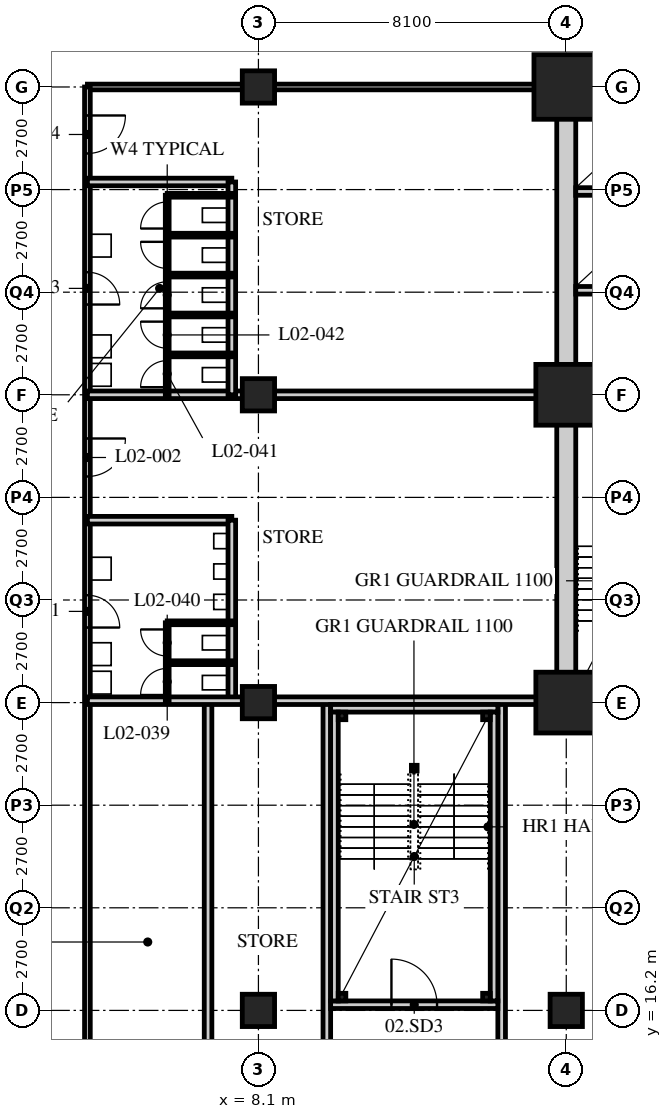
"""IFC4 building model, lengths in metres.
Left out: names, types, materials, properties, quantities, classifications, styles, units other than length and angle.
Written with IfcOpenShell. Run it as: python <this file> out.ifc"""

import sys

from ifc_helpers import new_model, si_unit, direction, frame, frame_2d, origin, origin_2d, place, context, subcontext, project, spatial, rectangle, hollow_rectangle, extrude, element, fill, save


model = new_model("IFC4")
c1 = context("Model", 3, precision=1e-05, world=origin(), true_north=direction((0.0, 1.0)))
c2 = subcontext(c1, "Body", "Model", "MODEL_VIEW")
j1 = project(units=[si_unit("LENGTHUNIT", "METRE"), si_unit("PLANEANGLEUNIT", "RADIAN")], contexts=[c1])
p1 = place(None, origin())
s1 = spatial("IfcSite", under=j1, at=p1, CompositionType="ELEMENT")
p2 = place(p1, origin())
s2 = spatial("IfcBuilding", under=s1, at=p2, CompositionType="ELEMENT")
p3 = place(p2, frame((0.0, 0.0, 11.4)))
s3 = spatial("IfcBuildingStorey", under=s2, at=p3, CompositionType="ELEMENT", Elevation=11.4)
for number, where, z_axis, x_axis in (
    (1, (8.1, 16.2, 0.0), (0.0, 0.0, 1.0), (1.0, 0.0, 0.0)),
    (2, (8.1, 24.3, 0.0), (0.0, 0.0, 1.0), (1.0, 0.0, 0.0)),
    (3, (8.1, 32.4, 0.0), (0.0, 0.0, 1.0), (1.0, 0.0, 0.0)),
    (4, (8.1, 40.5, 0.0), (0.0, 0.0, 1.0), (1.0, 0.0, 0.0)),
    (5, (16.2, 16.2, 0.0), (0.0, 0.0, 1.0), (1.0, 0.0, 0.0)),
):
    element("IfcColumn", number, at=place(p3, frame(where, z_axis=z_axis, x_axis=x_axis)), inside=s3, PredefinedType="COLUMN", context=c2, shape_type="SweptSolid", body=[
        extrude(hollow_rectangle(XDim=0.85, YDim=0.85, WallThickness=0.085, at=origin_2d()), origin(), (0.0, 0.0, 1.0), 5.4),
    ])
for number, where, z_axis, x_axis in (
    (6, (16.2, 24.3, 0.0), (0.0, 0.0, 1.0), (1.0, 0.0, 0.0)),
    (7, (16.2, 32.4, 0.0), (0.0, 0.0, 1.0), (1.0, 0.0, 0.0)),
):
    element("IfcColumn", number, at=place(p3, frame(where, z_axis=z_axis, x_axis=x_axis)), inside=s3, PredefinedType="COLUMN", context=c2, shape_type="SweptSolid", body=[
        extrude(hollow_rectangle(XDim=1.6, YDim=1.6, WallThickness=0.15, at=origin_2d()), origin(), (0.0, 0.0, 1.0), 5.4),
    ])
p4 = place(p3, frame((16.2, 40.5, 0.0), z_axis=(0.0, 0.0, 1.0), x_axis=(1.0, 0.0, 0.0)))
e8 = element("IfcColumn", 8, at=p4, inside=s3, PredefinedType="COLUMN", context=c2, shape_type="SweptSolid", body=[
    extrude(hollow_rectangle(XDim=1.7, YDim=1.7, WallThickness=0.16, at=origin_2d()), origin(), (0.0, 0.0, 1.0), 5.4),
])
p5 = place(p3, frame((16.0, 40.5, 0.0), z_axis=(0.0, 0.0, 1.0), x_axis=(-1.0, 0.0, 0.0)))
e9 = element("IfcWall", 9, at=p5, inside=s3, PredefinedType="PARTITIONING", context=c2, shape_type="SweptSolid", body=[
    extrude(rectangle(XDim=12.4, YDim=0.15, at=frame_2d((6.2, 0.0))), origin(), (0.0, 0.0, 1.0), 4.538),
])
p6 = place(p3, frame((3.6, 40.5, 0.0), z_axis=(0.0, 0.0, 1.0), x_axis=(0.0, -1.0, 0.0)))
e10 = element("IfcWall", 10, at=p6, inside=s3, PredefinedType="PARTITIONING", context=c2, shape_type="SweptSolid", body=[
    extrude(rectangle(XDim=28.8, YDim=0.15, at=frame_2d((14.4, 0.0))), origin(), (0.0, 0.0, 1.0), 5.15),
])
p7 = place(p6, frame((13.375, 0.0, 0.0)))
e11 = element("IfcOpeningElement", 11, at=p7, cuts=e10, PredefinedType="OPENING", context=c2, shape_type="SweptSolid", body=[
    extrude(rectangle(XDim=0.85, YDim=2.1, at=frame_2d((0.425, 1.05))), frame((0.0, 0.085, 0.0), z_axis=(0.0, -1.0, 0.0), x_axis=(1.0, 0.0, 0.0)), (0.0, 0.0, 1.0), 0.17),
])
p8 = place(p6, frame((9.25, 0.0, 0.0)))
e12 = element("IfcOpeningElement", 12, at=p8, cuts=e10, PredefinedType="OPENING", context=c2, shape_type="SweptSolid", body=[
    extrude(rectangle(XDim=1.0, YDim=2.1, at=frame_2d((0.5, 1.05))), frame((0.0, 0.085, 0.0), z_axis=(0.0, -1.0, 0.0), x_axis=(1.0, 0.0, 0.0)), (0.0, 0.0, 1.0), 0.17),
])
p9 = place(p6, frame((4.875, 0.0, 0.0)))
e13 = element("IfcOpeningElement", 13, at=p9, cuts=e10, PredefinedType="OPENING", context=c2, shape_type="SweptSolid", body=[
    extrude(rectangle(XDim=0.85, YDim=2.1, at=frame_2d((0.425, 1.05))), frame((0.0, 0.085, 0.0), z_axis=(0.0, -1.0, 0.0), x_axis=(1.0, 0.0, 0.0)), (0.0, 0.0, 1.0), 0.17),
])
p10 = place(p6, frame((0.75, 0.0, 0.0)))
e14 = element("IfcOpeningElement", 14, at=p10, cuts=e10, PredefinedType="OPENING", context=c2, shape_type="SweptSolid", body=[
    extrude(rectangle(XDim=1.0, YDim=2.1, at=frame_2d((0.5, 1.05))), frame((0.0, 0.085, 0.0), z_axis=(0.0, -1.0, 0.0), x_axis=(1.0, 0.0, 0.0)), (0.0, 0.0, 1.0), 0.17),
])
p11 = place(p3, frame((3.6, 32.4, 0.0), z_axis=(0.0, 0.0, 1.0), x_axis=(1.0, 0.0, 0.0)))
e15 = element("IfcWall", 15, at=p11, inside=s3, PredefinedType="SOLIDWALL", context=c2, shape_type="SweptSolid", body=[
    extrude(rectangle(XDim=12.6, YDim=0.2, at=frame_2d((6.3, 0.0))), origin(), (0.0, 0.0, 1.0), 4.538),
])
p12 = place(p3, frame((3.6, 29.1, 0.0), z_axis=(0.0, 0.0, 1.0), x_axis=(1.0, 0.0, 0.0)))
e16 = element("IfcWall", 16, at=p12, inside=s3, PredefinedType="SOLIDWALL", context=c2, shape_type="SweptSolid", body=[
    extrude(rectangle(XDim=3.8, YDim=0.2, at=frame_2d((1.9, 0.0))), origin(), (0.0, 0.0, 1.0), 5.15),
])
p13 = place(p3, frame((7.4, 24.3, 0.0), z_axis=(0.0, 0.0, 1.0), x_axis=(0.0, 1.0, 0.0)))
e17 = element("IfcWall", 17, at=p13, inside=s3, PredefinedType="SOLIDWALL", context=c2, shape_type="SweptSolid", body=[
    extrude(rectangle(XDim=4.8, YDim=0.2, at=frame_2d((2.4, 0.0))), origin(), (0.0, 0.0, 1.0), 5.15),
])
p14 = place(p3, frame((3.6, 38.0, 0.0), z_axis=(0.0, 0.0, 1.0), x_axis=(1.0, 0.0, 0.0)))
e18 = element("IfcWall", 18, at=p14, inside=s3, PredefinedType="SOLIDWALL", context=c2, shape_type="SweptSolid", body=[
    extrude(rectangle(XDim=3.8, YDim=0.2, at=frame_2d((1.9, 0.0))), origin(), (0.0, 0.0, 1.0), 5.15),
])
p15 = place(p3, frame((7.4, 32.4, 0.0), z_axis=(0.0, 0.0, 1.0), x_axis=(0.0, 1.0, 0.0)))
e19 = element("IfcWall", 19, at=p15, inside=s3, PredefinedType="SOLIDWALL", context=c2, shape_type="SweptSolid", body=[
    extrude(rectangle(XDim=5.6, YDim=0.2, at=frame_2d((2.8, 0.0))), origin(), (0.0, 0.0, 1.0), 5.15),
])
for number, where, z_axis, x_axis in (
    (20, (6.775, 11.7, 0.0), (0.0, 0.0, 1.0), (0.0, 1.0, 0.0)),
    (21, (9.9, 11.7, 0.0), (0.0, 0.0, 1.0), (0.0, 1.0, 0.0)),
    (22, (14.5, 11.7, 0.0), (0.0, 0.0, 1.0), (0.0, 1.0, 0.0)),
):
    element("IfcWall", number, at=place(p3, frame(where, z_axis=z_axis, x_axis=x_axis)), inside=s3, PredefinedType="SOLIDWALL", context=c2, shape_type="SweptSolid", body=[
        extrude(rectangle(XDim=12.6, YDim=0.2, at=frame_2d((6.3, 0.0))), origin(), (0.0, 0.0, 1.0), 5.15),
    ])
p16 = place(p3, frame((3.6, 24.35, 0.0), z_axis=(0.0, 0.0, 1.0), x_axis=(1.0, 0.0, 0.0)))
e23 = element("IfcWall", 23, at=p16, inside=s3, PredefinedType="SOLIDWALL", context=c2, shape_type="SweptSolid", body=[
    extrude(rectangle(XDim=12.6, YDim=0.2, at=frame_2d((6.3, 0.0))), origin(), (0.0, 0.0, 1.0), 4.538),
])
p17 = place(p3, frame((5.7, 24.3, 0.0), z_axis=(0.0, 0.0, 1.0), x_axis=(0.0, 1.0, 0.0)))
e24 = element("IfcWall", 24, at=p17, inside=s3, PredefinedType="PARTITIONING", context=c2, shape_type="SweptSolid", body=[
    extrude(rectangle(XDim=2.1, YDim=0.1, at=frame_2d((1.05, 0.0))), origin(), (0.0, 0.0, 1.0), 5.15),
])
p18 = place(p17, frame((0.2, 0.0, 0.0)))
e25 = element("IfcOpeningElement", 25, at=p18, cuts=e24, PredefinedType="OPENING", context=c2, shape_type="SweptSolid", body=[
    extrude(rectangle(XDim=0.7, YDim=2.0, at=frame_2d((0.35, 1.0))), frame((0.0, 0.06, 0.0), z_axis=(0.0, -1.0, 0.0), x_axis=(1.0, 0.0, 0.0)), (0.0, 0.0, 1.0), 0.12),
])
p19 = place(p17, frame((1.225, 0.0, 0.0)))
e26 = element("IfcOpeningElement", 26, at=p19, cuts=e24, PredefinedType="OPENING", context=c2, shape_type="SweptSolid", body=[
    extrude(rectangle(XDim=0.7, YDim=2.0, at=frame_2d((0.35, 1.0))), frame((0.0, 0.06, 0.0), z_axis=(0.0, -1.0, 0.0), x_axis=(1.0, 0.0, 0.0)), (0.0, 0.0, 1.0), 0.12),
])
for number, where, z_axis, x_axis in (
    (27, (5.7, 25.35, 0.0), (0.0, 0.0, 1.0), (1.0, 0.0, 0.0)),
    (28, (5.7, 26.4, 0.0), (0.0, 0.0, 1.0), (1.0, 0.0, 0.0)),
):
    element("IfcWall", number, at=place(p3, frame(where, z_axis=z_axis, x_axis=x_axis)), inside=s3, PredefinedType="PARTITIONING", context=c2, shape_type="SweptSolid", body=[
        extrude(rectangle(XDim=1.7, YDim=0.1, at=frame_2d((0.85, 0.0))), origin(), (0.0, 0.0, 1.0), 5.15),
    ])
p20 = place(p3, frame((5.7, 32.4, 0.0), z_axis=(0.0, 0.0, 1.0), x_axis=(0.0, 1.0, 0.0)))
e29 = element("IfcWall", 29, at=p20, inside=s3, PredefinedType="PARTITIONING", context=c2, shape_type="SweptSolid", body=[
    extrude(rectangle(XDim=5.25, YDim=0.1, at=frame_2d((2.625, 0.0))), origin(), (0.0, 0.0, 1.0), 5.15),
])
p21 = place(p20, frame((0.2, 0.0, 0.0)))
e30 = element("IfcOpeningElement", 30, at=p21, cuts=e29, PredefinedType="OPENING", context=c2, shape_type="SweptSolid", body=[
    extrude(rectangle(XDim=0.7, YDim=2.0, at=frame_2d((0.35, 1.0))), frame((0.0, 0.06, 0.0), z_axis=(0.0, -1.0, 0.0), x_axis=(1.0, 0.0, 0.0)), (0.0, 0.0, 1.0), 0.12),
])
p22 = place(p20, frame((1.225, 0.0, 0.0)))
e31 = element("IfcOpeningElement", 31, at=p22, cuts=e29, PredefinedType="OPENING", context=c2, shape_type="SweptSolid", body=[
    extrude(rectangle(XDim=0.7, YDim=2.0, at=frame_2d((0.35, 1.0))), frame((0.0, 0.06, 0.0), z_axis=(0.0, -1.0, 0.0), x_axis=(1.0, 0.0, 0.0)), (0.0, 0.0, 1.0), 0.12),
])
p23 = place(p20, frame((2.275, 0.0, 0.0)))
e32 = element("IfcOpeningElement", 32, at=p23, cuts=e29, PredefinedType="OPENING", context=c2, shape_type="SweptSolid", body=[
    extrude(rectangle(XDim=0.7, YDim=2.0, at=frame_2d((0.35, 1.0))), frame((0.0, 0.06, 0.0), z_axis=(0.0, -1.0, 0.0), x_axis=(1.0, 0.0, 0.0)), (0.0, 0.0, 1.0), 0.12),
])
p24 = place(p20, frame((3.325, 0.0, 0.0)))
e33 = element("IfcOpeningElement", 33, at=p24, cuts=e29, PredefinedType="OPENING", context=c2, shape_type="SweptSolid", body=[
    extrude(rectangle(XDim=0.7, YDim=2.0, at=frame_2d((0.35, 1.0))), frame((0.0, 0.06, 0.0), z_axis=(0.0, -1.0, 0.0), x_axis=(1.0, 0.0, 0.0)), (0.0, 0.0, 1.0), 0.12),
])
p25 = place(p20, frame((4.375, 0.0, 0.0)))
e34 = element("IfcOpeningElement", 34, at=p25, cuts=e29, PredefinedType="OPENING", context=c2, shape_type="SweptSolid", body=[
    extrude(rectangle(XDim=0.7, YDim=2.0, at=frame_2d((0.35, 1.0))), frame((0.0, 0.06, 0.0), z_axis=(0.0, -1.0, 0.0), x_axis=(1.0, 0.0, 0.0)), (0.0, 0.0, 1.0), 0.12),
])
for number, where, z_axis, x_axis in (
    (35, (5.7, 33.45, 0.0), (0.0, 0.0, 1.0), (1.0, 0.0, 0.0)),
    (36, (5.7, 34.5, 0.0), (0.0, 0.0, 1.0), (1.0, 0.0, 0.0)),
    (37, (5.7, 35.55, 0.0), (0.0, 0.0, 1.0), (1.0, 0.0, 0.0)),
    (38, (5.7, 36.6, 0.0), (0.0, 0.0, 1.0), (1.0, 0.0, 0.0)),
    (39, (5.7, 37.65, 0.0), (0.0, 0.0, 1.0), (1.0, 0.0, 0.0)),
):
    element("IfcWall", number, at=place(p3, frame(where, z_axis=z_axis, x_axis=x_axis)), inside=s3, PredefinedType="PARTITIONING", context=c2, shape_type="SweptSolid", body=[
        extrude(rectangle(XDim=1.7, YDim=0.1, at=frame_2d((0.85, 0.0))), origin(), (0.0, 0.0, 1.0), 5.15),
    ])
p26 = place(p3, frame((15.95, 24.3, 0.0), z_axis=(0.0, 0.0, 1.0), x_axis=(1.0, 0.0, 0.0)))
e40 = element("IfcWall", 40, at=p26, inside=s3, PredefinedType="SOLIDWALL", context=c2, shape_type="SweptSolid", body=[
    extrude(rectangle(XDim=24.8, YDim=0.5, at=frame_2d((12.4, 0.0))), origin(), (0.0, 0.0, 1.0), 4.5),
])
p27 = place(p26, frame((11.5, 0.0, 0.0)))
e41 = element("IfcOpeningElement", 41, at=p27, cuts=e40, PredefinedType="OPENING", context=c2, shape_type="SweptSolid", body=[
    extrude(rectangle(XDim=1.8, YDim=2.4, at=frame_2d((0.9, 1.2))), frame((0.0, 0.26, 0.0), z_axis=(0.0, -1.0, 0.0), x_axis=(1.0, 0.0, 0.0)), (0.0, 0.0, 1.0), 0.52),
])
p28 = place(p3, frame((15.95, 40.5, 0.0), z_axis=(0.0, 0.0, 1.0), x_axis=(1.0, 0.0, 0.0)))
e42 = element("IfcWall", 42, at=p28, inside=s3, PredefinedType="SOLIDWALL", context=c2, shape_type="SweptSolid", body=[
    extrude(rectangle(XDim=24.8, YDim=0.5, at=frame_2d((12.4, 0.0))), origin(), (0.0, 0.0, 1.0), 4.5),
])
p29 = place(p28, frame((11.5, 0.0, 0.0)))
e43 = element("IfcOpeningElement", 43, at=p29, cuts=e42, PredefinedType="OPENING", context=c2, shape_type="SweptSolid", body=[
    extrude(rectangle(XDim=1.8, YDim=2.4, at=frame_2d((0.9, 1.2))), frame((0.0, 0.26, 0.0), z_axis=(0.0, -1.0, 0.0), x_axis=(1.0, 0.0, 0.0)), (0.0, 0.0, 1.0), 0.52),
])
p30 = place(p3, frame((16.2, 24.55, 0.0), z_axis=(0.0, 0.0, 1.0), x_axis=(0.0, 1.0, 0.0)))
e44 = element("IfcWall", 44, at=p30, inside=s3, PredefinedType="SOLIDWALL", context=c2, shape_type="SweptSolid", body=[
    extrude(rectangle(XDim=15.7, YDim=0.5, at=frame_2d((7.85, 0.0))), origin(), (0.0, 0.0, 1.0), 4.538),
])
p31 = place(p3, frame((16.45, 32.4, 0.0), z_axis=(0.0, 0.0, 1.0), x_axis=(1.0, 0.0, 0.0)))
e45 = element("IfcWall", 45, at=p31, inside=s3, PredefinedType="SOLIDWALL", context=c2, shape_type="SweptSolid", body=[
    extrude(rectangle(XDim=7.95, YDim=0.2, at=frame_2d((3.975, 0.0))), origin(), (0.0, 0.0, 1.0), 4.45),
])
for number, where, z_axis, x_axis in (
    (46, (16.45, 35.15, 0.0), (0.0, 0.0, 1.0), (1.0, 0.0, 0.0)),
    (47, (16.45, 37.75, 0.0), (0.0, 0.0, 1.0), (1.0, 0.0, 0.0)),
):
    element("IfcWall", number, at=place(p3, frame(where, z_axis=z_axis, x_axis=x_axis)), inside=s3, PredefinedType="SOLIDWALL", context=c2, shape_type="SweptSolid", body=[
        extrude(rectangle(XDim=2.6, YDim=0.2, at=frame_2d((1.3, 0.0))), origin(), (0.0, 0.0, 1.0), 5.15),
    ])
p32 = place(p3, frame((10.0, 16.35, 0.0), z_axis=(0.0, 0.0, 1.0), x_axis=(1.0, 0.0, 0.0)))
e48 = element("IfcWall", 48, at=p32, inside=s3, PredefinedType="SOLIDWALL", context=c2, shape_type="SweptSolid", body=[
    extrude(rectangle(XDim=4.4, YDim=0.2, at=frame_2d((2.2, 0.0))), origin(), (0.0, 0.0, 1.0), 4.538),
])
p33 = place(p32, frame((1.6, 0.0, 0.0)))
e49 = element("IfcOpeningElement", 49, at=p33, cuts=e48, PredefinedType="OPENING", context=c2, shape_type="SweptSolid", body=[
    extrude(rectangle(XDim=1.2, YDim=2.1, at=frame_2d((0.6, 1.05))), frame((0.0, 0.11, 0.0), z_axis=(0.0, -1.0, 0.0), x_axis=(1.0, 0.0, 0.0)), (0.0, 0.0, 1.0), 0.22),
])
p34 = place(p3, frame((10.0, 24.15, 0.0), z_axis=(0.0, 0.0, 1.0), x_axis=(1.0, 0.0, 0.0)))
e50 = element("IfcWall", 50, at=p34, inside=s3, PredefinedType="SOLIDWALL", context=c2, shape_type="SweptSolid", body=[
    extrude(rectangle(XDim=4.4, YDim=0.2, at=frame_2d((2.2, 0.0))), origin(), (0.0, 0.0, 1.0), 4.538),
])
for number, where, z_axis, x_axis in (
    (51, (10.1, 16.45, 0.0), (0.0, 0.0, 1.0), (0.0, 1.0, 0.0)),
    (52, (14.3, 16.45, 0.0), (0.0, 0.0, 1.0), (0.0, 1.0, 0.0)),
):
    element("IfcWall", number, at=place(p3, frame(where, z_axis=z_axis, x_axis=x_axis)), inside=s3, PredefinedType="SOLIDWALL", context=c2, shape_type="SweptSolid", body=[
        extrude(rectangle(XDim=7.6, YDim=0.2, at=frame_2d((3.8, 0.0))), origin(), (0.0, 0.0, 1.0), 5.15),
    ])
for number, where, z_axis, x_axis in (
    (53, (10.3, 23.95, 0.0), (0.0, 0.0, 1.0), (1.0, 0.0, 0.0)),
    (54, (14.1, 23.95, 0.0), (0.0, 0.0, 1.0), (1.0, 0.0, 0.0)),
    (55, (10.3, 16.55, 0.0), (0.0, 0.0, 1.0), (1.0, 0.0, 0.0)),
    (56, (14.1, 16.55, 0.0), (0.0, 0.0, 1.0), (1.0, 0.0, 0.0)),
):
    element("IfcColumn", number, at=place(p3, frame(where, z_axis=z_axis, x_axis=x_axis)), inside=s3, PredefinedType="COLUMN", context=c2, shape_type="SweptSolid", body=[
        extrude(hollow_rectangle(XDim=0.2, YDim=0.2, WallThickness=0.012, at=origin_2d()), origin(), (0.0, 0.0, 1.0), 5.4),
    ])
p35 = place(p3, frame((12.2, 22.575, 0.0), z_axis=(0.0, 0.0, 1.0), x_axis=(1.0, 0.0, 0.0)))
e57 = element("IfcColumn", 57, at=p35, inside=s3, PredefinedType="COLUMN", context=c2, shape_type="SweptSolid", body=[
    extrude(hollow_rectangle(XDim=0.15, YDim=0.15, WallThickness=0.01, at=origin_2d()), origin(), (0.0, 0.0, 1.0), 5.4),
])
p36 = place(p7, origin())
e58 = element("IfcDoor", 58, at=p36, inside=s3, OperationType="SINGLE_SWING_RIGHT", PredefinedType="DOOR", context=c2, shape_type="SweptSolid", body=[
    extrude(rectangle(XDim=0.85, YDim=2.1, at=frame_2d((0.425, 1.05))), frame((0.0, 0.025, 0.0), z_axis=(0.0, -1.0, 0.0), x_axis=(1.0, 0.0, 0.0)), (0.0, 0.0, 1.0), 0.05),
])
fill(e11, e58)
p37 = place(p8, origin())
e59 = element("IfcDoor", 59, at=p37, inside=s3, OperationType="SINGLE_SWING_LEFT", PredefinedType="DOOR", context=c2, shape_type="SweptSolid", body=[
    extrude(rectangle(XDim=1.0, YDim=2.1, at=frame_2d((0.5, 1.05))), frame((0.0, 0.025, 0.0), z_axis=(0.0, -1.0, 0.0), x_axis=(1.0, 0.0, 0.0)), (0.0, 0.0, 1.0), 0.05),
])
fill(e12, e59)
p38 = place(p9, origin())
e60 = element("IfcDoor", 60, at=p38, inside=s3, OperationType="SINGLE_SWING_RIGHT", PredefinedType="DOOR", context=c2, shape_type="SweptSolid", body=[
    extrude(rectangle(XDim=0.85, YDim=2.1, at=frame_2d((0.425, 1.05))), frame((0.0, 0.025, 0.0), z_axis=(0.0, -1.0, 0.0), x_axis=(1.0, 0.0, 0.0)), (0.0, 0.0, 1.0), 0.05),
])
fill(e13, e60)
p39 = place(p10, origin())
e61 = element("IfcDoor", 61, at=p39, inside=s3, OperationType="SINGLE_SWING_LEFT", PredefinedType="DOOR", context=c2, shape_type="SweptSolid", body=[
    extrude(rectangle(XDim=1.0, YDim=2.1, at=frame_2d((0.5, 1.05))), frame((0.0, 0.025, 0.0), z_axis=(0.0, -1.0, 0.0), x_axis=(1.0, 0.0, 0.0)), (0.0, 0.0, 1.0), 0.05),
])
fill(e14, e61)
p40 = place(p18, origin())
e62 = element("IfcDoor", 62, at=p40, inside=s3, OperationType="SINGLE_SWING_LEFT", PredefinedType="DOOR", context=c2, shape_type="SweptSolid", body=[
    extrude(rectangle(XDim=0.7, YDim=2.0, at=frame_2d((0.35, 1.0))), frame((0.0, 0.025, 0.0), z_axis=(0.0, -1.0, 0.0), x_axis=(1.0, 0.0, 0.0)), (0.0, 0.0, 1.0), 0.05),
])
fill(e25, e62)
p41 = place(p19, origin())
e63 = element("IfcDoor", 63, at=p41, inside=s3, OperationType="SINGLE_SWING_RIGHT", PredefinedType="DOOR", context=c2, shape_type="SweptSolid", body=[
    extrude(rectangle(XDim=0.7, YDim=2.0, at=frame_2d((0.35, 1.0))), frame((0.0, 0.025, 0.0), z_axis=(0.0, -1.0, 0.0), x_axis=(1.0, 0.0, 0.0)), (0.0, 0.0, 1.0), 0.05),
])
fill(e26, e63)
p42 = place(p21, origin())
e64 = element("IfcDoor", 64, at=p42, inside=s3, OperationType="SINGLE_SWING_LEFT", PredefinedType="DOOR", context=c2, shape_type="SweptSolid", body=[
    extrude(rectangle(XDim=0.7, YDim=2.0, at=frame_2d((0.35, 1.0))), frame((0.0, 0.025, 0.0), z_axis=(0.0, -1.0, 0.0), x_axis=(1.0, 0.0, 0.0)), (0.0, 0.0, 1.0), 0.05),
])
fill(e30, e64)
p43 = place(p22, origin())
e65 = element("IfcDoor", 65, at=p43, inside=s3, OperationType="SINGLE_SWING_RIGHT", PredefinedType="DOOR", context=c2, shape_type="SweptSolid", body=[
    extrude(rectangle(XDim=0.7, YDim=2.0, at=frame_2d((0.35, 1.0))), frame((0.0, 0.025, 0.0), z_axis=(0.0, -1.0, 0.0), x_axis=(1.0, 0.0, 0.0)), (0.0, 0.0, 1.0), 0.05),
])
fill(e31, e65)
p44 = place(p23, origin())
e66 = element("IfcDoor", 66, at=p44, inside=s3, OperationType="SINGLE_SWING_LEFT", PredefinedType="DOOR", context=c2, shape_type="SweptSolid", body=[
    extrude(rectangle(XDim=0.7, YDim=2.0, at=frame_2d((0.35, 1.0))), frame((0.0, 0.025, 0.0), z_axis=(0.0, -1.0, 0.0), x_axis=(1.0, 0.0, 0.0)), (0.0, 0.0, 1.0), 0.05),
])
fill(e32, e66)
p45 = place(p24, origin())
e67 = element("IfcDoor", 67, at=p45, inside=s3, OperationType="SINGLE_SWING_RIGHT", PredefinedType="DOOR", context=c2, shape_type="SweptSolid", body=[
    extrude(rectangle(XDim=0.7, YDim=2.0, at=frame_2d((0.35, 1.0))), frame((0.0, 0.025, 0.0), z_axis=(0.0, -1.0, 0.0), x_axis=(1.0, 0.0, 0.0)), (0.0, 0.0, 1.0), 0.05),
])
fill(e33, e67)
p46 = place(p25, origin())
e68 = element("IfcDoor", 68, at=p46, inside=s3, OperationType="SINGLE_SWING_LEFT", PredefinedType="DOOR", context=c2, shape_type="SweptSolid", body=[
    extrude(rectangle(XDim=0.7, YDim=2.0, at=frame_2d((0.35, 1.0))), frame((0.0, 0.025, 0.0), z_axis=(0.0, -1.0, 0.0), x_axis=(1.0, 0.0, 0.0)), (0.0, 0.0, 1.0), 0.05),
])
fill(e34, e68)
p47 = place(p33, origin())
e69 = element("IfcDoor", 69, at=p47, inside=s3, OperationType="SINGLE_SWING_LEFT", PredefinedType="DOOR", context=c2, shape_type="SweptSolid", body=[
    extrude(rectangle(XDim=1.2, YDim=2.1, at=frame_2d((0.6, 1.05))), frame((0.0, 0.025, 0.0), z_axis=(0.0, -1.0, 0.0), x_axis=(1.0, 0.0, 0.0)), (0.0, 0.0, 1.0), 0.05),
])
fill(e49, e69)
save(model, sys.argv[1])
